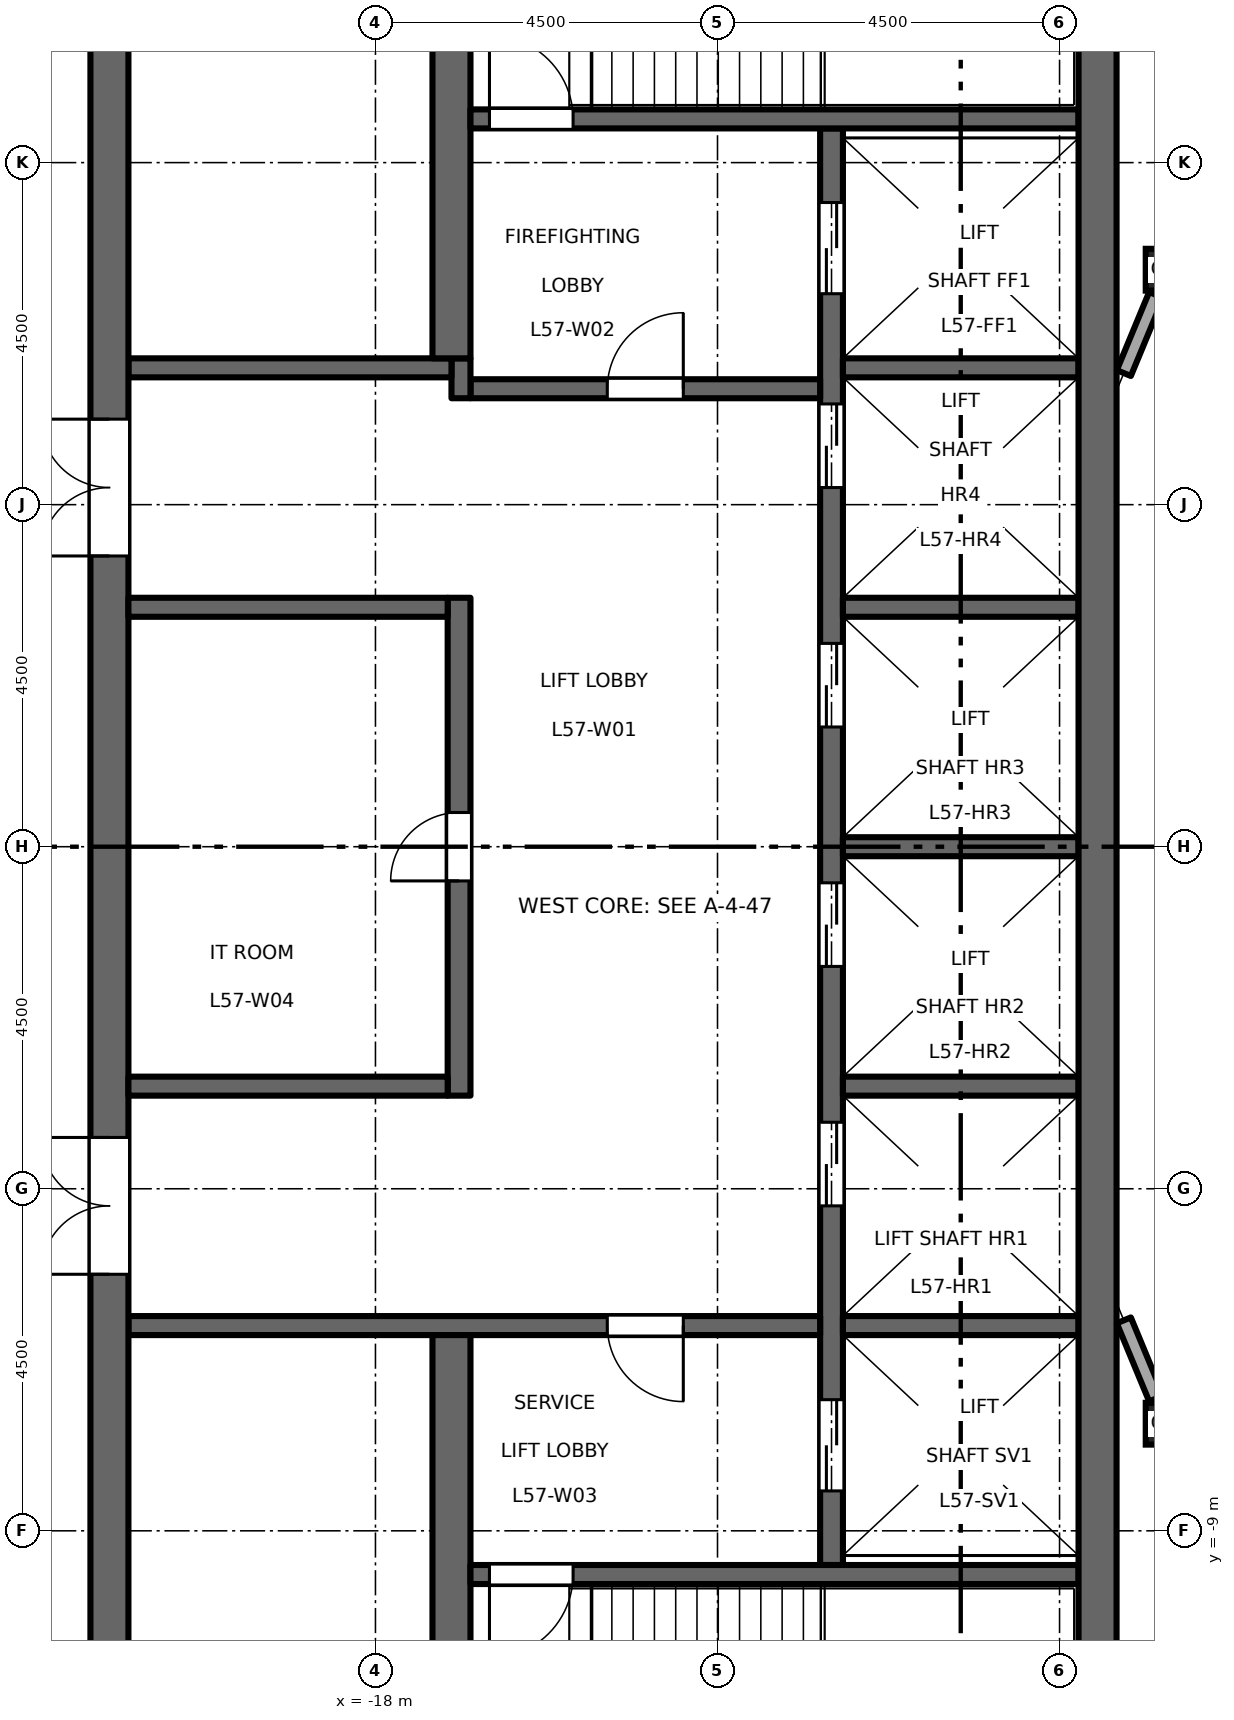
"""IFC4 building model, lengths in metres.
Left out: names, types, materials, properties, quantities, classifications, styles, units other than length and angle.
Written with IfcOpenShell. Run it as: python <this file> out.ifc"""

import sys

from ifc_helpers import new_model, si_unit, direction, frame, frame_2d, origin, origin_2d, place, context, subcontext, project, spatial, rectangle, hollow_rectangle, extrude, element, fill, save


model = new_model("IFC4")
c1 = context("Model", 3, precision=1e-05, world=origin(), true_north=direction((0.0, 1.0)))
c2 = subcontext(c1, "Body", "Model", "MODEL_VIEW")
j1 = project(units=[si_unit("LENGTHUNIT", "METRE"), si_unit("PLANEANGLEUNIT", "RADIAN")], contexts=[c1])
p1 = place(None, origin())
s1 = spatial("IfcSite", under=j1, at=p1, CompositionType="ELEMENT")
p2 = place(p1, origin())
s2 = spatial("IfcBuilding", under=s1, at=p2, CompositionType="ELEMENT")
p3 = place(p2, frame((0.0, 0.0, 264.7)))
s3 = spatial("IfcBuildingStorey", under=s2, at=p3, CompositionType="ELEMENT", Elevation=264.7)
for number, where, z_axis, x_axis in (
    (1, (-7.591, -7.591, 0.0), (0.0, 0.0, 1.0), (1.0, 0.0, 0.0)),
    (2, (-7.591, 7.591, 0.0), (0.0, 0.0, 1.0), (1.0, 0.0, 0.0)),
):
    element("IfcColumn", number, at=place(p3, frame(where, z_axis=z_axis, x_axis=x_axis)), inside=s3, PredefinedType="COLUMN", context=c2, shape_type="SweptSolid", body=[
        extrude(hollow_rectangle(XDim=0.55, YDim=0.55, WallThickness=0.028, at=origin_2d()), origin(), (0.0, 0.0, 1.0), 4.5),
    ])
p4 = place(p3, frame((-12.0, -9.45, 0.0), z_axis=(0.0, 0.0, 1.0), x_axis=(0.0, 1.0, 0.0)))
e3 = element("IfcWall", 3, at=p4, inside=s3, PredefinedType="SHEAR", context=c2, shape_type="SweptSolid", body=[
    extrude(rectangle(XDim=18.9, YDim=0.3, at=frame_2d((9.45, 0.0))), origin(), (0.0, 0.0, 1.0), 4.35),
])
p5 = place(p4, frame((4.725, 0.0, 0.0)))
e4 = element("IfcOpeningElement", 4, at=p5, cuts=e3, PredefinedType="OPENING", context=c2, shape_type="SweptSolid", body=[
    extrude(rectangle(XDim=1.1, YDim=2.1, at=frame_2d((0.55, 1.05))), frame((0.0, 0.16, 0.0), z_axis=(0.0, -1.0, 0.0), x_axis=(1.0, 0.0, 0.0)), (0.0, 0.0, 1.0), 0.32),
])
p6 = place(p4, frame((7.875, 0.0, 0.0)))
e5 = element("IfcOpeningElement", 5, at=p6, cuts=e3, PredefinedType="OPENING", context=c2, shape_type="SweptSolid", body=[
    extrude(rectangle(XDim=1.1, YDim=2.1, at=frame_2d((0.55, 1.05))), frame((0.0, 0.16, 0.0), z_axis=(0.0, -1.0, 0.0), x_axis=(1.0, 0.0, 0.0)), (0.0, 0.0, 1.0), 0.32),
])
p7 = place(p4, frame((11.025, 0.0, 0.0)))
e6 = element("IfcOpeningElement", 6, at=p7, cuts=e3, PredefinedType="OPENING", context=c2, shape_type="SweptSolid", body=[
    extrude(rectangle(XDim=1.1, YDim=2.1, at=frame_2d((0.55, 1.05))), frame((0.0, 0.16, 0.0), z_axis=(0.0, -1.0, 0.0), x_axis=(1.0, 0.0, 0.0)), (0.0, 0.0, 1.0), 0.32),
])
p8 = place(p4, frame((14.175, 0.0, 0.0)))
e7 = element("IfcOpeningElement", 7, at=p8, cuts=e3, PredefinedType="OPENING", context=c2, shape_type="SweptSolid", body=[
    extrude(rectangle(XDim=1.1, YDim=2.1, at=frame_2d((0.55, 1.05))), frame((0.0, 0.16, 0.0), z_axis=(0.0, -1.0, 0.0), x_axis=(1.0, 0.0, 0.0)), (0.0, 0.0, 1.0), 0.32),
])
p9 = place(p4, frame((16.725, 0.0, 0.0)))
e8 = element("IfcOpeningElement", 8, at=p9, cuts=e3, PredefinedType="OPENING", context=c2, shape_type="SweptSolid", body=[
    extrude(rectangle(XDim=1.2, YDim=2.1, at=frame_2d((0.6, 1.05))), frame((0.0, 0.16, 0.0), z_axis=(0.0, -1.0, 0.0), x_axis=(1.0, 0.0, 0.0)), (0.0, 0.0, 1.0), 0.32),
])
p10 = place(p4, frame((0.975, 0.0, 0.0)))
e9 = element("IfcOpeningElement", 9, at=p10, cuts=e3, PredefinedType="OPENING", context=c2, shape_type="SweptSolid", body=[
    extrude(rectangle(XDim=1.2, YDim=2.1, at=frame_2d((0.6, 1.05))), frame((0.0, 0.16, 0.0), z_axis=(0.0, -1.0, 0.0), x_axis=(1.0, 0.0, 0.0)), (0.0, 0.0, 1.0), 0.32),
])
p11 = place(p3, frame((-12.15, 6.025, 0.0), z_axis=(0.0, 0.0, 1.0), x_axis=(-1.0, 0.0, 0.0)))
e10 = element("IfcWall", 10, at=p11, inside=s3, PredefinedType="SHEAR", context=c2, shape_type="SweptSolid", body=[
    extrude(rectangle(XDim=4.6, YDim=0.25, at=frame_2d((2.3, 0.0))), origin(), (0.0, 0.0, 1.0), 4.35),
])
p12 = place(p11, frame((1.8, 0.0, 0.0)))
e11 = element("IfcOpeningElement", 11, at=p12, cuts=e10, PredefinedType="OPENING", context=c2, shape_type="SweptSolid", body=[
    extrude(rectangle(XDim=1.0, YDim=2.1, at=frame_2d((0.5, 1.05))), frame((0.0, 0.135, 0.0), z_axis=(0.0, -1.0, 0.0), x_axis=(1.0, 0.0, 0.0)), (0.0, 0.0, 1.0), 0.27),
])
p13 = place(p3, frame((-16.875, 5.9, 0.0), z_axis=(0.0, 0.0, 1.0), x_axis=(0.0, 1.0, 0.0)))
e12 = element("IfcWall", 12, at=p13, inside=s3, PredefinedType="SHEAR", context=c2, shape_type="SweptSolid", body=[
    extrude(rectangle(XDim=0.525, YDim=0.25, at=frame_2d((0.263, 0.0))), origin(), (0.0, 0.0, 1.0), 4.35),
])
p14 = place(p3, frame((-17.0, 6.3, 0.0), z_axis=(0.0, 0.0, 1.0), x_axis=(-1.0, 0.0, 0.0)))
e13 = element("IfcWall", 13, at=p14, inside=s3, PredefinedType="SHEAR", context=c2, shape_type="SweptSolid", body=[
    extrude(rectangle(XDim=4.25, YDim=0.25, at=frame_2d((2.125, 0.0))), origin(), (0.0, 0.0, 1.0), 4.35),
])
p15 = place(p3, frame((-12.15, -6.3, 0.0), z_axis=(0.0, 0.0, 1.0), x_axis=(-1.0, 0.0, 0.0)))
e14 = element("IfcWall", 14, at=p15, inside=s3, PredefinedType="SHEAR", context=c2, shape_type="SweptSolid", body=[
    extrude(rectangle(XDim=9.1, YDim=0.25, at=frame_2d((4.55, 0.0))), origin(), (0.0, 0.0, 1.0), 4.35),
])
p16 = place(p15, frame((1.8, 0.0, 0.0)))
e15 = element("IfcOpeningElement", 15, at=p16, cuts=e14, PredefinedType="OPENING", context=c2, shape_type="SweptSolid", body=[
    extrude(rectangle(XDim=1.0, YDim=2.1, at=frame_2d((0.5, 1.05))), frame((0.0, 0.135, 0.0), z_axis=(0.0, -1.0, 0.0), x_axis=(1.0, 0.0, 0.0)), (0.0, 0.0, 1.0), 0.27),
])
p17 = place(p3, frame((-21.5, -13.0, 0.0), z_axis=(0.0, 0.0, 1.0), x_axis=(0.0, 1.0, 0.0)))
e16 = element("IfcWall", 16, at=p17, inside=s3, PredefinedType="SHEAR", context=c2, shape_type="SweptSolid", body=[
    extrude(rectangle(XDim=26.0, YDim=0.5, at=frame_2d((13.0, 0.0))), origin(), (0.0, 0.0, 1.0), 4.35),
])
p18 = place(p17, frame((16.825, 0.0, 0.0)))
e17 = element("IfcOpeningElement", 17, at=p18, cuts=e16, PredefinedType="OPENING", context=c2, shape_type="SweptSolid", body=[
    extrude(rectangle(XDim=1.8, YDim=2.1, at=frame_2d((0.9, 1.05))), frame((0.0, 0.26, 0.0), z_axis=(0.0, -1.0, 0.0), x_axis=(1.0, 0.0, 0.0)), (0.0, 0.0, 1.0), 0.52),
])
p19 = place(p17, frame((7.375, 0.0, 0.0)))
e18 = element("IfcOpeningElement", 18, at=p19, cuts=e16, PredefinedType="OPENING", context=c2, shape_type="SweptSolid", body=[
    extrude(rectangle(XDim=1.8, YDim=2.1, at=frame_2d((0.9, 1.05))), frame((0.0, 0.26, 0.0), z_axis=(0.0, -1.0, 0.0), x_axis=(1.0, 0.0, 0.0)), (0.0, 0.0, 1.0), 0.52),
])
p20 = place(p3, frame((-16.9, -3.275, 0.0), z_axis=(0.0, 0.0, 1.0), x_axis=(0.0, 1.0, 0.0)))
e19 = element("IfcWall", 19, at=p20, inside=s3, PredefinedType="SHEAR", context=c2, shape_type="SweptSolid", body=[
    extrude(rectangle(XDim=6.55, YDim=0.3, at=frame_2d((3.275, 0.0))), origin(), (0.0, 0.0, 1.0), 4.35),
])
p21 = place(p20, frame((2.825, 0.0, 0.0)))
e20 = element("IfcOpeningElement", 20, at=p21, cuts=e19, PredefinedType="OPENING", context=c2, shape_type="SweptSolid", body=[
    extrude(rectangle(XDim=0.9, YDim=2.1, at=frame_2d((0.45, 1.05))), frame((0.0, 0.16, 0.0), z_axis=(0.0, -1.0, 0.0), x_axis=(1.0, 0.0, 0.0)), (0.0, 0.0, 1.0), 0.32),
])
for number, where, z_axis, x_axis in (
    (21, (-17.05, 3.15, 0.0), (0.0, 0.0, 1.0), (-1.0, 0.0, 0.0)),
    (22, (-17.05, -3.15, 0.0), (0.0, 0.0, 1.0), (-1.0, 0.0, 0.0)),
):
    element("IfcWall", number, at=place(p3, frame(where, z_axis=z_axis, x_axis=x_axis)), inside=s3, PredefinedType="SHEAR", context=c2, shape_type="SweptSolid", body=[
        extrude(rectangle(XDim=4.2, YDim=0.25, at=frame_2d((2.1, 0.0))), origin(), (0.0, 0.0, 1.0), 4.35),
    ])
for number, where, z_axis, x_axis in (
    (23, (-17.0, 6.425, 0.0), (0.0, 0.0, 1.0), (0.0, 1.0, 0.0)),
    (24, (-17.0, -13.0, 0.0), (0.0, 0.0, 1.0), (0.0, 1.0, 0.0)),
):
    element("IfcWall", number, at=place(p3, frame(where, z_axis=z_axis, x_axis=x_axis)), inside=s3, PredefinedType="SHEAR", context=c2, shape_type="SweptSolid", body=[
        extrude(rectangle(XDim=6.575, YDim=0.5, at=frame_2d((3.288, 0.0))), origin(), (0.0, 0.0, 1.0), 4.35),
    ])
for number, where, z_axis, x_axis in (
    (25, (-8.75, 0.0, 0.0), (0.0, 0.0, 1.0), (-1.0, 0.0, 0.0)),
    (26, (-8.75, 3.15, 0.0), (0.0, 0.0, 1.0), (-1.0, 0.0, 0.0)),
    (27, (-8.75, 6.3, 0.0), (0.0, 0.0, 1.0), (-1.0, 0.0, 0.0)),
    (28, (-8.75, -3.15, 0.0), (0.0, 0.0, 1.0), (-1.0, 0.0, 0.0)),
    (29, (-8.75, -6.3, 0.0), (0.0, 0.0, 1.0), (-1.0, 0.0, 0.0)),
):
    element("IfcWall", number, at=place(p3, frame(where, z_axis=z_axis, x_axis=x_axis)), inside=s3, PredefinedType="SHEAR", context=c2, shape_type="SweptSolid", body=[
        extrude(rectangle(XDim=3.1, YDim=0.25, at=frame_2d((1.55, 0.0))), origin(), (0.0, 0.0, 1.0), 4.35),
    ])
p22 = place(p3, frame((-8.75, 9.575, 0.0), z_axis=(0.0, 0.0, 1.0), x_axis=(-1.0, 0.0, 0.0)))
e30 = element("IfcWall", 30, at=p22, inside=s3, PredefinedType="SHEAR", context=c2, shape_type="SweptSolid", body=[
    extrude(rectangle(XDim=8.0, YDim=0.25, at=frame_2d((4.0, 0.0))), origin(), (0.0, 0.0, 1.0), 4.35),
])
p23 = place(p22, frame((6.65, 0.0, 0.0)))
e31 = element("IfcOpeningElement", 31, at=p23, cuts=e30, PredefinedType="OPENING", context=c2, shape_type="SweptSolid", body=[
    extrude(rectangle(XDim=1.1, YDim=2.1, at=frame_2d((0.55, 1.05))), frame((0.0, 0.135, 0.0), z_axis=(0.0, -1.0, 0.0), x_axis=(1.0, 0.0, 0.0)), (0.0, 0.0, 1.0), 0.27),
])
p24 = place(p3, frame((-8.75, -9.575, 0.0), z_axis=(0.0, 0.0, 1.0), x_axis=(-1.0, 0.0, 0.0)))
e32 = element("IfcWall", 32, at=p24, inside=s3, PredefinedType="SHEAR", context=c2, shape_type="SweptSolid", body=[
    extrude(rectangle(XDim=8.0, YDim=0.25, at=frame_2d((4.0, 0.0))), origin(), (0.0, 0.0, 1.0), 4.35),
])
p25 = place(p24, frame((6.65, 0.0, 0.0)))
e33 = element("IfcOpeningElement", 33, at=p25, cuts=e32, PredefinedType="OPENING", context=c2, shape_type="SweptSolid", body=[
    extrude(rectangle(XDim=1.1, YDim=2.1, at=frame_2d((0.55, 1.05))), frame((0.0, 0.135, 0.0), z_axis=(0.0, -1.0, 0.0), x_axis=(1.0, 0.0, 0.0)), (0.0, 0.0, 1.0), 0.27),
])
p26 = place(p3, frame((-8.5, -13.0, 0.0), z_axis=(0.0, 0.0, 1.0), x_axis=(0.0, 1.0, 0.0)))
e34 = element("IfcWall", 34, at=p26, inside=s3, PredefinedType="SHEAR", context=c2, shape_type="SweptSolid", body=[
    extrude(rectangle(XDim=26.0, YDim=0.5, at=frame_2d((13.0, 0.0))), origin(), (0.0, 0.0, 1.0), 4.35),
])
for number, where, z_axis, x_axis in (
    (35, (-7.729, 7.259, 0.0), (0.0, 0.0, 1.0), (-0.383, -0.924, 0.0)),
    (36, (-8.154, -6.231, 0.0), (0.0, 0.0, 1.0), (0.383, -0.924, 0.0)),
):
    element("IfcWall", number, at=place(p3, frame(where, z_axis=z_axis, x_axis=x_axis)), inside=s3, PredefinedType="STANDARD", context=c2, shape_type="SweptSolid", body=[
        extrude(rectangle(XDim=1.113, YDim=0.2, at=frame_2d((0.556, 0.0))), origin(), (0.0, 0.0, 1.0), 3.918),
    ])
p27 = place(p12, origin())
e37 = element("IfcDoor", 37, at=p27, inside=s3, OperationType="SINGLE_SWING_LEFT", PredefinedType="DOOR", context=c2, shape_type="SweptSolid", body=[
    extrude(rectangle(XDim=1.0, YDim=2.1, at=frame_2d((0.5, 1.05))), frame((0.0, 0.025, 0.0), z_axis=(0.0, -1.0, 0.0), x_axis=(1.0, 0.0, 0.0)), (0.0, 0.0, 1.0), 0.05),
])
fill(e11, e37)
p28 = place(p16, origin())
e38 = element("IfcDoor", 38, at=p28, inside=s3, OperationType="SINGLE_SWING_RIGHT", PredefinedType="DOOR", context=c2, shape_type="SweptSolid", body=[
    extrude(rectangle(XDim=1.0, YDim=2.1, at=frame_2d((0.5, 1.05))), frame((0.0, 0.025, 0.0), z_axis=(0.0, -1.0, 0.0), x_axis=(1.0, 0.0, 0.0)), (0.0, 0.0, 1.0), 0.05),
])
fill(e15, e38)
p29 = place(p23, origin())
e39 = element("IfcDoor", 39, at=p29, inside=s3, OperationType="SINGLE_SWING_RIGHT", PredefinedType="DOOR", context=c2, shape_type="SweptSolid", body=[
    extrude(rectangle(XDim=1.1, YDim=2.1, at=frame_2d((0.55, 1.05))), frame((0.0, 0.025, 0.0), z_axis=(0.0, -1.0, 0.0), x_axis=(1.0, 0.0, 0.0)), (0.0, 0.0, 1.0), 0.05),
])
fill(e31, e39)
p30 = place(p25, origin())
e40 = element("IfcDoor", 40, at=p30, inside=s3, OperationType="SINGLE_SWING_LEFT", PredefinedType="DOOR", context=c2, shape_type="SweptSolid", body=[
    extrude(rectangle(XDim=1.1, YDim=2.1, at=frame_2d((0.55, 1.05))), frame((0.0, 0.025, 0.0), z_axis=(0.0, -1.0, 0.0), x_axis=(1.0, 0.0, 0.0)), (0.0, 0.0, 1.0), 0.05),
])
fill(e33, e40)
p31 = place(p18, origin())
e41 = element("IfcDoor", 41, at=p31, inside=s3, OperationType="DOUBLE_DOOR_DOUBLE_SWING", PredefinedType="DOOR", context=c2, shape_type="SweptSolid", body=[
    extrude(rectangle(XDim=1.8, YDim=2.1, at=frame_2d((0.9, 1.05))), frame((0.0, 0.025, 0.0), z_axis=(0.0, -1.0, 0.0), x_axis=(1.0, 0.0, 0.0)), (0.0, 0.0, 1.0), 0.05),
])
fill(e17, e41)
p32 = place(p19, origin())
e42 = element("IfcDoor", 42, at=p32, inside=s3, OperationType="DOUBLE_DOOR_DOUBLE_SWING", PredefinedType="DOOR", context=c2, shape_type="SweptSolid", body=[
    extrude(rectangle(XDim=1.8, YDim=2.1, at=frame_2d((0.9, 1.05))), frame((0.0, 0.025, 0.0), z_axis=(0.0, -1.0, 0.0), x_axis=(1.0, 0.0, 0.0)), (0.0, 0.0, 1.0), 0.05),
])
fill(e18, e42)
p33 = place(p5, origin())
e43 = element("IfcDoor", 43, at=p33, inside=s3, OperationType="DOUBLE_DOOR_SLIDING", PredefinedType="DOOR", context=c2, shape_type="SweptSolid", body=[
    extrude(rectangle(XDim=1.1, YDim=2.1, at=frame_2d((0.55, 1.05))), frame((0.0, 0.025, 0.0), z_axis=(0.0, -1.0, 0.0), x_axis=(1.0, 0.0, 0.0)), (0.0, 0.0, 1.0), 0.05),
])
fill(e4, e43)
p34 = place(p6, origin())
e44 = element("IfcDoor", 44, at=p34, inside=s3, OperationType="DOUBLE_DOOR_SLIDING", PredefinedType="DOOR", context=c2, shape_type="SweptSolid", body=[
    extrude(rectangle(XDim=1.1, YDim=2.1, at=frame_2d((0.55, 1.05))), frame((0.0, 0.025, 0.0), z_axis=(0.0, -1.0, 0.0), x_axis=(1.0, 0.0, 0.0)), (0.0, 0.0, 1.0), 0.05),
])
fill(e5, e44)
p35 = place(p7, origin())
e45 = element("IfcDoor", 45, at=p35, inside=s3, OperationType="DOUBLE_DOOR_SLIDING", PredefinedType="DOOR", context=c2, shape_type="SweptSolid", body=[
    extrude(rectangle(XDim=1.1, YDim=2.1, at=frame_2d((0.55, 1.05))), frame((0.0, 0.025, 0.0), z_axis=(0.0, -1.0, 0.0), x_axis=(1.0, 0.0, 0.0)), (0.0, 0.0, 1.0), 0.05),
])
fill(e6, e45)
p36 = place(p8, origin())
e46 = element("IfcDoor", 46, at=p36, inside=s3, OperationType="DOUBLE_DOOR_SLIDING", PredefinedType="DOOR", context=c2, shape_type="SweptSolid", body=[
    extrude(rectangle(XDim=1.1, YDim=2.1, at=frame_2d((0.55, 1.05))), frame((0.0, 0.025, 0.0), z_axis=(0.0, -1.0, 0.0), x_axis=(1.0, 0.0, 0.0)), (0.0, 0.0, 1.0), 0.05),
])
fill(e7, e46)
p37 = place(p9, origin())
e47 = element("IfcDoor", 47, at=p37, inside=s3, OperationType="DOUBLE_DOOR_SLIDING", PredefinedType="DOOR", context=c2, shape_type="SweptSolid", body=[
    extrude(rectangle(XDim=1.2, YDim=2.1, at=frame_2d((0.6, 1.05))), frame((0.0, 0.025, 0.0), z_axis=(0.0, -1.0, 0.0), x_axis=(1.0, 0.0, 0.0)), (0.0, 0.0, 1.0), 0.05),
])
fill(e8, e47)
p38 = place(p10, origin())
e48 = element("IfcDoor", 48, at=p38, inside=s3, OperationType="DOUBLE_DOOR_SLIDING", PredefinedType="DOOR", context=c2, shape_type="SweptSolid", body=[
    extrude(rectangle(XDim=1.2, YDim=2.1, at=frame_2d((0.6, 1.05))), frame((0.0, 0.025, 0.0), z_axis=(0.0, -1.0, 0.0), x_axis=(1.0, 0.0, 0.0)), (0.0, 0.0, 1.0), 0.05),
])
fill(e9, e48)
p39 = place(p21, origin())
e49 = element("IfcDoor", 49, at=p39, inside=s3, OperationType="SINGLE_SWING_RIGHT", PredefinedType="DOOR", context=c2, shape_type="SweptSolid", body=[
    extrude(rectangle(XDim=0.9, YDim=2.1, at=frame_2d((0.45, 1.05))), frame((0.0, 0.025, 0.0), z_axis=(0.0, -1.0, 0.0), x_axis=(1.0, 0.0, 0.0)), (0.0, 0.0, 1.0), 0.05),
])
fill(e20, e49)
save(model, sys.argv[1])
